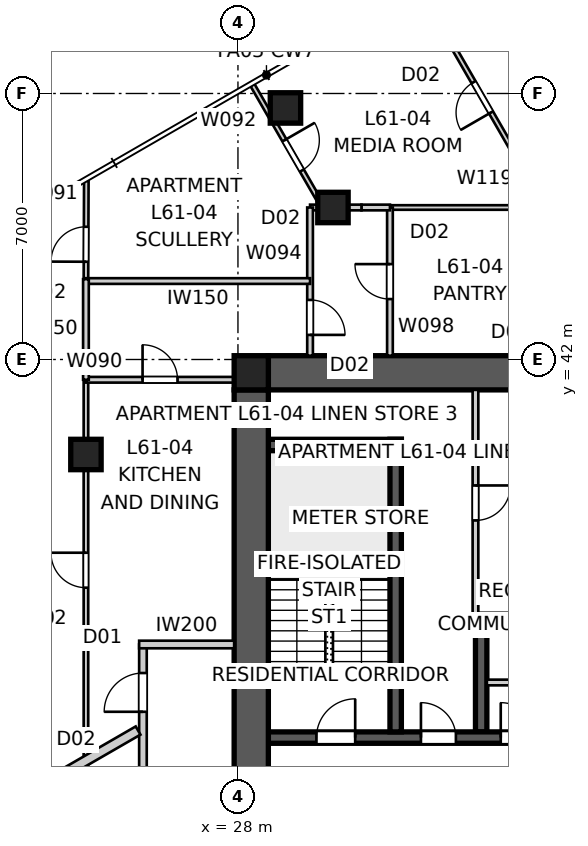
"""IFC4 building model, lengths in metres.
Left out: names, types, materials, properties, quantities, classifications, styles, units other than length and angle.
Written with IfcOpenShell. Run it as: python <this file> out.ifc"""

import sys

from ifc_helpers import new_model, si_unit, direction, frame, frame_2d, origin, origin_2d, place, context, subcontext, project, spatial, polyline, rectangle, outline, extrude, element, fill, save


model = new_model("IFC4")
c1 = context("Model", 3, precision=1e-05, world=origin(), true_north=direction((0.0, 1.0)))
c2 = subcontext(c1, "Body", "Model", "MODEL_VIEW")
j1 = project(units=[si_unit("LENGTHUNIT", "METRE"), si_unit("PLANEANGLEUNIT", "RADIAN")], contexts=[c1])
p1 = place(None, origin())
s1 = spatial("IfcSite", under=j1, at=p1, CompositionType="ELEMENT")
p2 = place(p1, origin())
s2 = spatial("IfcBuilding", under=s1, at=p2, CompositionType="ELEMENT")
p3 = place(p2, frame((0.0, 0.0, 221.8)))
s3 = spatial("IfcBuildingStorey", under=s2, at=p3, CompositionType="ELEMENT", Elevation=221.8)
p4 = place(p3, frame((28.8, 41.65, 0.0), z_axis=(0.0, 0.0, 1.0), x_axis=(1.0, 0.0, 0.0)))
e1 = element("IfcWall", 1, at=p4, inside=s3, PredefinedType="SHEAR", context=c2, shape_type="SweptSolid", body=[
    extrude(outline(polyline([(0.0, -0.45), (22.4, -0.45), (22.4, -0.025), (22.85, -0.025), (22.85, 0.025), (22.4, 0.025), (22.4, 0.45), (0.0, 0.45), (0.0, 0.025), (-0.45, 0.025), (-0.45, -0.025), (0.0, -0.025), (0.0, -0.45)])), origin(), (0.0, 0.0, 1.0), 3.4),
])
p5 = place(p3, frame((28.35, 41.2, 0.0), z_axis=(0.0, 0.0, 1.0), x_axis=(0.0, -1.0, 0.0)))
e2 = element("IfcWall", 2, at=p5, inside=s3, PredefinedType="SHEAR", context=c2, shape_type="SweptSolid", body=[
    extrude(outline(polyline([(0.0, -0.45), (22.4, -0.45), (22.4, -0.025), (22.85, -0.025), (22.85, 0.025), (22.4, 0.025), (22.4, 0.45), (0.0, 0.45), (0.0, 0.025), (-0.45, 0.025), (-0.45, -0.025), (0.0, -0.025), (0.0, -0.45)])), origin(), (0.0, 0.0, 1.0), 3.4),
])
p6 = place(p5, frame((11.14, 0.0, 0.0)))
e3 = element("IfcOpeningElement", 3, at=p6, cuts=e2, PredefinedType="OPENING", context=c2, shape_type="SweptSolid", body=[
    extrude(rectangle(XDim=1.02, YDim=2.4, at=frame_2d((0.51, 1.2))), frame((0.0, 0.46, 0.0), z_axis=(0.0, -1.0, 0.0), x_axis=(1.0, 0.0, 0.0)), (0.0, 0.0, 1.0), 0.92),
])
p7 = place(p3, frame((28.8, 32.05, 0.0), z_axis=(0.0, 0.0, 1.0), x_axis=(1.0, 0.0, 0.0)))
e4 = element("IfcWall", 4, at=p7, inside=s3, PredefinedType="SHEAR", context=c2, shape_type="SweptSolid", body=[
    extrude(rectangle(XDim=22.4, YDim=0.3, at=frame_2d((11.2, 0.0))), origin(), (0.0, 0.0, 1.0), 3.4),
])
p8 = place(p7, frame((19.04, 0.0, 0.0)))
e5 = element("IfcOpeningElement", 5, at=p8, cuts=e4, PredefinedType="OPENING", context=c2, shape_type="SweptSolid", body=[
    extrude(rectangle(XDim=0.92, YDim=2.1, at=frame_2d((0.46, 1.05))), frame((0.0, 0.16, 0.0), z_axis=(0.0, -1.0, 0.0), x_axis=(1.0, 0.0, 0.0)), (0.0, 0.0, 1.0), 0.32),
])
p9 = place(p7, frame((1.265, 0.0, 0.0)))
e6 = element("IfcOpeningElement", 6, at=p9, cuts=e4, PredefinedType="OPENING", context=c2, shape_type="SweptSolid", body=[
    extrude(rectangle(XDim=1.02, YDim=2.1, at=frame_2d((0.51, 1.05))), frame((0.0, 0.16, 0.0), z_axis=(0.0, -1.0, 0.0), x_axis=(1.0, 0.0, 0.0)), (0.0, 0.0, 1.0), 0.32),
])
p10 = place(p7, frame((4.015, 0.0, 0.0)))
e7 = element("IfcOpeningElement", 7, at=p10, cuts=e4, PredefinedType="OPENING", context=c2, shape_type="SweptSolid", body=[
    extrude(rectangle(XDim=0.92, YDim=2.1, at=frame_2d((0.46, 1.05))), frame((0.0, 0.16, 0.0), z_axis=(0.0, -1.0, 0.0), x_axis=(1.0, 0.0, 0.0)), (0.0, 0.0, 1.0), 0.32),
])
p11 = place(p7, frame((6.115, 0.0, 0.0)))
e8 = element("IfcOpeningElement", 8, at=p11, cuts=e4, PredefinedType="OPENING", context=c2, shape_type="SweptSolid", body=[
    extrude(rectangle(XDim=0.92, YDim=2.1, at=frame_2d((0.46, 1.05))), frame((0.0, 0.16, 0.0), z_axis=(0.0, -1.0, 0.0), x_axis=(1.0, 0.0, 0.0)), (0.0, 0.0, 1.0), 0.32),
])
p12 = place(p7, frame((9.79, 0.0, 0.0)))
e9 = element("IfcOpeningElement", 9, at=p12, cuts=e4, PredefinedType="OPENING", context=c2, shape_type="SweptSolid", body=[
    extrude(rectangle(XDim=0.92, YDim=2.1, at=frame_2d((0.46, 1.05))), frame((0.0, 0.16, 0.0), z_axis=(0.0, -1.0, 0.0), x_axis=(1.0, 0.0, 0.0)), (0.0, 0.0, 1.0), 0.32),
])
p13 = place(p7, frame((12.05, 0.0, 0.0)))
e10 = element("IfcOpeningElement", 10, at=p13, cuts=e4, PredefinedType="OPENING", context=c2, shape_type="SweptSolid", body=[
    extrude(rectangle(XDim=1.1, YDim=2.1, at=frame_2d((0.55, 1.05))), frame((0.0, 0.16, 0.0), z_axis=(0.0, -1.0, 0.0), x_axis=(1.0, 0.0, 0.0)), (0.0, 0.0, 1.0), 0.32),
])
p14 = place(p7, frame((14.85, 0.0, 0.0)))
e11 = element("IfcOpeningElement", 11, at=p14, cuts=e4, PredefinedType="OPENING", context=c2, shape_type="SweptSolid", body=[
    extrude(rectangle(XDim=1.1, YDim=2.1, at=frame_2d((0.55, 1.05))), frame((0.0, 0.16, 0.0), z_axis=(0.0, -1.0, 0.0), x_axis=(1.0, 0.0, 0.0)), (0.0, 0.0, 1.0), 0.32),
])
p15 = place(p3, frame((34.25, 35.15, 0.0), z_axis=(0.0, 0.0, 1.0), x_axis=(1.0, 0.0, 0.0)))
e12 = element("IfcWall", 12, at=p15, inside=s3, PredefinedType="SHEAR", context=c2, shape_type="SweptSolid", body=[
    extrude(rectangle(XDim=11.5, YDim=0.3, at=frame_2d((5.75, 0.0))), origin(), (0.0, 0.0, 1.0), 3.4),
])
p16 = place(p3, frame((34.4, 32.2, 0.0), z_axis=(0.0, 0.0, 1.0), x_axis=(0.0, 1.0, 0.0)))
e13 = element("IfcWall", 13, at=p16, inside=s3, PredefinedType="SHEAR", context=c2, shape_type="SweptSolid", body=[
    extrude(rectangle(XDim=2.8, YDim=0.3, at=frame_2d((1.4, 0.0))), origin(), (0.0, 0.0, 1.0), 3.4),
])
p17 = place(p3, frame((32.15, 32.2, 0.0), z_axis=(0.0, 0.0, 1.0), x_axis=(0.0, 1.0, 0.0)))
e14 = element("IfcWall", 14, at=p17, inside=s3, PredefinedType="SHEAR", context=c2, shape_type="SweptSolid", body=[
    extrude(rectangle(XDim=7.7, YDim=0.3, at=frame_2d((3.85, 0.0))), origin(), (0.0, 0.0, 1.0), 3.4),
])
p18 = place(p3, frame((28.8, 39.75, 0.0), z_axis=(0.0, 0.0, 1.0), x_axis=(1.0, 0.0, 0.0)))
e15 = element("IfcWall", 15, at=p18, inside=s3, PredefinedType="SHEAR", context=c2, shape_type="SweptSolid", body=[
    extrude(rectangle(XDim=3.5, YDim=0.3, at=frame_2d((1.75, 0.0))), origin(), (0.0, 0.0, 1.0), 3.4),
])
p19 = place(p3, frame((28.35, 41.65, 0.0), z_axis=(0.0, 0.0, 1.0), x_axis=(1.0, 0.0, 0.0)))
e16 = element("IfcColumn", 16, at=p19, inside=s3, PredefinedType="COLUMN", context=c2, shape_type="SweptSolid", body=[
    extrude(rectangle(XDim=0.9, YDim=0.9, at=origin_2d()), origin(), (0.0, 0.0, 1.0), 3.4),
])
for number, where, z_axis, x_axis in (
    (17, (29.25, 48.62, 0.0), (0.0, 0.0, 1.0), (1.0, 0.0, 0.0)),
    (18, (30.5, 46.0, 0.0), (0.0, 0.0, 1.0), (1.0, 0.0, 0.0)),
    (19, (24.0, 39.5, 0.0), (0.0, 0.0, 1.0), (1.0, 0.0, 0.0)),
):
    element("IfcColumn", number, at=place(p3, frame(where, z_axis=z_axis, x_axis=x_axis)), inside=s3, PredefinedType="COLUMN", context=c2, shape_type="SweptSolid", body=[
        extrude(rectangle(XDim=0.8, YDim=0.8, at=origin_2d()), origin(), (0.0, 0.0, 1.0), 3.4),
    ])
p20 = place(p3, frame((25.5, 25.5, 0.0), z_axis=(0.0, 0.0, 1.0), x_axis=(0.0, 1.0, 0.0)))
e20 = element("IfcWall", 20, at=p20, inside=s3, PredefinedType="PARTITIONING", context=c2, shape_type="SweptSolid", body=[
    extrude(rectangle(XDim=9.0, YDim=0.2, at=frame_2d((4.5, 0.0))), origin(), (0.0, 0.0, 1.0), 3.25),
])
p21 = place(p20, frame((3.492, 0.0, 0.0)))
e21 = element("IfcOpeningElement", 21, at=p21, cuts=e20, PredefinedType="OPENING", context=c2, shape_type="SweptSolid", body=[
    extrude(rectangle(XDim=1.02, YDim=2.34, at=frame_2d((0.51, 1.17))), frame((0.0, 0.11, 0.0), z_axis=(0.0, -1.0, 0.0), x_axis=(1.0, 0.0, 0.0)), (0.0, 0.0, 1.0), 0.22),
])
p22 = place(p20, frame((7.229, 0.0, 0.0)))
e22 = element("IfcOpeningElement", 22, at=p22, cuts=e20, PredefinedType="OPENING", context=c2, shape_type="SweptSolid", body=[
    extrude(rectangle(XDim=1.02, YDim=2.34, at=frame_2d((0.51, 1.17))), frame((0.0, 0.11, 0.0), z_axis=(0.0, -1.0, 0.0), x_axis=(1.0, 0.0, 0.0)), (0.0, 0.0, 1.0), 0.22),
])
p23 = place(p3, frame((27.9, 34.5, 0.0), z_axis=(0.0, 0.0, 1.0), x_axis=(-1.0, 0.0, 0.0)))
e23 = element("IfcWall", 23, at=p23, inside=s3, PredefinedType="PARTITIONING", context=c2, shape_type="SweptSolid", body=[
    extrude(rectangle(XDim=2.5, YDim=0.2, at=frame_2d((1.25, 0.0))), origin(), (0.0, 0.0, 1.0), 3.25),
])
p24 = place(p3, frame((15.889, 26.761, 0.0), z_axis=(0.0, 0.0, 1.0), x_axis=(0.866024069551, 0.500002310952, 0.0)))
e24 = element("IfcWall", 24, at=p24, inside=s3, PredefinedType="PARTITIONING", context=c2, shape_type="SweptSolid", body=[
    extrude(rectangle(XDim=10.95, YDim=0.25, at=frame_2d((5.475, 0.0))), origin(), (0.0, 0.0, 1.0), 3.25),
])
p25 = place(p3, frame((34.25, 41.2, 0.0), z_axis=(0.0, 0.0, 1.0), x_axis=(0.0, -1.0, 0.0)))
e25 = element("IfcWall", 25, at=p25, inside=s3, PredefinedType="SOLIDWALL", context=c2, shape_type="SweptSolid", body=[
    extrude(rectangle(XDim=5.95, YDim=0.15, at=frame_2d((2.975, 0.0))), origin(), (0.0, 0.0, 1.0), 3.25),
])
p26 = place(p25, frame((2.515, 0.0, 0.0)))
e26 = element("IfcOpeningElement", 26, at=p26, cuts=e25, PredefinedType="OPENING", context=c2, shape_type="SweptSolid", body=[
    extrude(rectangle(XDim=0.92, YDim=2.1, at=frame_2d((0.46, 1.05))), frame((0.0, 0.085, 0.0), z_axis=(0.0, -1.0, 0.0), x_axis=(1.0, 0.0, 0.0)), (0.0, 0.0, 1.0), 0.17),
])
p27 = place(p3, frame((24.0, 15.422, 0.0), z_axis=(0.0, 0.0, 1.0), x_axis=(0.0, 1.0, 0.0)))
e27 = element("IfcWall", 27, at=p27, inside=s3, PredefinedType="PARTITIONING", context=c2, shape_type="SweptSolid", body=[
    extrude(rectangle(XDim=26.045, YDim=0.12, at=frame_2d((13.022, 0.0))), origin(), (0.0, 0.0, 1.0), 2.55),
])
p28 = place(p27, frame((13.139, 0.0, 0.0)))
e28 = element("IfcOpeningElement", 28, at=p28, cuts=e27, PredefinedType="OPENING", context=c2, shape_type="SweptSolid", body=[
    extrude(rectangle(XDim=0.92, YDim=2.34, at=frame_2d((0.46, 1.17))), frame((0.0, 0.07, 0.0), z_axis=(0.0, -1.0, 0.0), x_axis=(1.0, 0.0, 0.0)), (0.0, 0.0, 1.0), 0.14),
])
p29 = place(p27, frame((20.573, 0.0, 0.0)))
e29 = element("IfcOpeningElement", 29, at=p29, cuts=e27, PredefinedType="OPENING", context=c2, shape_type="SweptSolid", body=[
    extrude(rectangle(XDim=0.92, YDim=2.34, at=frame_2d((0.46, 1.17))), frame((0.0, 0.07, 0.0), z_axis=(0.0, -1.0, 0.0), x_axis=(1.0, 0.0, 0.0)), (0.0, 0.0, 1.0), 0.14),
])
p30 = place(p27, frame((0.42, 0.0, 0.0)))
e30 = element("IfcOpeningElement", 30, at=p30, cuts=e27, PredefinedType="OPENING", context=c2, shape_type="SweptSolid", body=[
    extrude(rectangle(XDim=0.92, YDim=2.34, at=frame_2d((0.46, 1.17))), frame((0.0, 0.07, 0.0), z_axis=(0.0, -1.0, 0.0), x_axis=(1.0, 0.0, 0.0)), (0.0, 0.0, 1.0), 0.14),
])
p31 = place(p3, frame((24.0, 41.467, 0.0), z_axis=(0.0, 0.0, 1.0), x_axis=(1.0, 0.0, 0.0)))
e31 = element("IfcWall", 31, at=p31, inside=s3, PredefinedType="SOLIDWALL", context=c2, shape_type="SweptSolid", body=[
    extrude(rectangle(XDim=4.82, YDim=0.15, at=frame_2d((2.41, 0.0))), origin(), (0.0, 0.0, 1.0), 3.25),
])
p32 = place(p31, frame((1.49, 0.0, 0.0)))
e32 = element("IfcOpeningElement", 32, at=p32, cuts=e31, PredefinedType="OPENING", context=c2, shape_type="SweptSolid", body=[
    extrude(rectangle(XDim=0.92, YDim=2.1, at=frame_2d((0.46, 1.05))), frame((0.0, 0.085, 0.0), z_axis=(0.0, -1.0, 0.0), x_axis=(1.0, 0.0, 0.0)), (0.0, 0.0, 1.0), 0.17),
])
p33 = place(p3, frame((24.0, 44.115, 0.0), z_axis=(0.0, 0.0, 1.0), x_axis=(0.003773202081, 0.999992881448, 0.0)))
e33 = element("IfcWall", 33, at=p33, inside=s3, PredefinedType="PARTITIONING", context=c2, shape_type="SweptSolid", body=[
    extrude(rectangle(XDim=2.588, YDim=0.12, at=frame_2d((1.294, 0.0))), origin(), (0.0, 0.0, 1.0), 3.25),
])
p34 = place(p33, frame((0.458, 0.0, 0.0)))
e34 = element("IfcOpeningElement", 34, at=p34, cuts=e33, PredefinedType="OPENING", context=c2, shape_type="SweptSolid", body=[
    extrude(rectangle(XDim=0.92, YDim=2.34, at=frame_2d((0.46, 1.17))), frame((0.0, 0.07, 0.0), z_axis=(0.0, -1.0, 0.0), x_axis=(1.0, 0.0, 0.0)), (0.0, 0.0, 1.0), 0.14),
])
p35 = place(p3, frame((28.38, 49.226, 0.0), z_axis=(0.0, 0.0, 1.0), x_axis=(0.499973989716, -0.866040420308, 0.0)))
e35 = element("IfcWall", 35, at=p35, inside=s3, PredefinedType="PARTITIONING", context=c2, shape_type="SweptSolid", body=[
    extrude(rectangle(XDim=3.725, YDim=0.12, at=frame_2d((1.862, 0.0))), origin(), (0.0, 0.0, 1.0), 3.25),
])
p36 = place(p35, frame((1.682, 0.0, 0.0)))
e36 = element("IfcOpeningElement", 36, at=p36, cuts=e35, PredefinedType="OPENING", context=c2, shape_type="SweptSolid", body=[
    extrude(rectangle(XDim=0.92, YDim=2.34, at=frame_2d((0.46, 1.17))), frame((0.0, 0.07, 0.0), z_axis=(0.0, -1.0, 0.0), x_axis=(1.0, 0.0, 0.0)), (0.0, 0.0, 1.0), 0.14),
])
p37 = place(p3, frame((30.633, 46.0, 0.0), z_axis=(0.0, 0.0, 1.0), x_axis=(-1.0, 0.0, 0.0)))
e37 = element("IfcWall", 37, at=p37, inside=s3, PredefinedType="SOLIDWALL", context=c2, shape_type="SweptSolid", body=[
    extrude(rectangle(XDim=0.735, YDim=0.15, at=frame_2d((0.368, 0.0))), origin(), (0.0, 0.0, 1.0), 3.25),
])
p38 = place(p3, frame((29.897, 46.0, 0.0), z_axis=(0.0, 0.0, 1.0), x_axis=(0.0, -1.0, 0.0)))
e38 = element("IfcWall", 38, at=p38, inside=s3, PredefinedType="SOLIDWALL", context=c2, shape_type="SweptSolid", body=[
    extrude(rectangle(XDim=3.9, YDim=0.15, at=frame_2d((1.95, 0.0))), origin(), (0.0, 0.0, 1.0), 3.25),
])
p39 = place(p38, frame((2.433, 0.0, 0.0)))
e39 = element("IfcOpeningElement", 39, at=p39, cuts=e38, PredefinedType="OPENING", context=c2, shape_type="SweptSolid", body=[
    extrude(rectangle(XDim=0.92, YDim=2.34, at=frame_2d((0.46, 1.17))), frame((0.0, 0.085, 0.0), z_axis=(0.0, -1.0, 0.0), x_axis=(1.0, 0.0, 0.0)), (0.0, 0.0, 1.0), 0.17),
])
p40 = place(p3, frame((29.897, 44.065, 0.0), z_axis=(0.0, 0.0, 1.0), x_axis=(-1.0, 0.0, 0.0)))
e40 = element("IfcWall", 40, at=p40, inside=s3, PredefinedType="SOLIDWALL", context=c2, shape_type="SweptSolid", body=[
    extrude(rectangle(XDim=5.897, YDim=0.15, at=frame_2d((2.949, 0.0))), origin(), (0.0, 0.0, 1.0), 3.25),
])
p41 = place(p3, frame((32.0, 46.0, 0.0), z_axis=(0.0, 0.0, 1.0), x_axis=(1.0, 0.0, 0.0)))
e41 = element("IfcWall", 41, at=p41, inside=s3, PredefinedType="PARTITIONING", context=c2, shape_type="SweptSolid", body=[
    extrude(rectangle(XDim=17.213, YDim=0.12, at=frame_2d((8.607, 0.0))), origin(), (0.0, 0.0, 1.0), 3.25),
])
p42 = place(p3, frame((32.0, 42.1, 0.0), z_axis=(0.0, 0.0, 1.0), x_axis=(0.0, 1.0, 0.0)))
e42 = element("IfcWall", 42, at=p42, inside=s3, PredefinedType="SOLIDWALL", context=c2, shape_type="SweptSolid", body=[
    extrude(rectangle(XDim=3.9, YDim=0.15, at=frame_2d((1.95, 0.0))), origin(), (0.0, 0.0, 1.0), 3.25),
])
p43 = place(p42, frame((1.49, 0.0, 0.0)))
e43 = element("IfcOpeningElement", 43, at=p43, cuts=e42, PredefinedType="OPENING", context=c2, shape_type="SweptSolid", body=[
    extrude(rectangle(XDim=0.92, YDim=2.34, at=frame_2d((0.46, 1.17))), frame((0.0, 0.085, 0.0), z_axis=(0.0, -1.0, 0.0), x_axis=(1.0, 0.0, 0.0)), (0.0, 0.0, 1.0), 0.17),
])
p44 = place(p3, frame((24.0, 44.115, 0.0), z_axis=(0.0, 0.0, 1.0), x_axis=(0.0, -1.0, 0.0)))
e44 = element("IfcWall", 44, at=p44, inside=s3, PredefinedType="SOLIDWALL", context=c2, shape_type="SweptSolid", body=[
    extrude(rectangle(XDim=2.648, YDim=0.15, at=frame_2d((1.324, 0.0))), origin(), (0.0, 0.0, 1.0), 3.25),
])
p45 = place(p3, frame((36.103, 46.0, 0.0), z_axis=(0.0, 0.0, 1.0), x_axis=(-0.500013541994, 0.866017585169, 0.0)))
e45 = element("IfcWall", 45, at=p45, inside=s3, PredefinedType="PARTITIONING", context=c2, shape_type="SweptSolid", body=[
    extrude(rectangle(XDim=6.655, YDim=0.12, at=frame_2d((3.328, 0.0))), origin(), (0.0, 0.0, 1.0), 3.25),
])
p46 = place(p45, frame((2.887, 0.0, 0.0)))
e46 = element("IfcOpeningElement", 46, at=p46, cuts=e45, PredefinedType="OPENING", context=c2, shape_type="SweptSolid", body=[
    extrude(rectangle(XDim=0.92, YDim=2.34, at=frame_2d((0.46, 1.17))), frame((0.0, 0.07, 0.0), z_axis=(0.0, -1.0, 0.0), x_axis=(1.0, 0.0, 0.0)), (0.0, 0.0, 1.0), 0.14),
])
p47 = place(p3, frame((32.0, 46.0, 0.0), z_axis=(0.0, 0.0, 1.0), x_axis=(-1.0, 0.0, 0.0)))
e47 = element("IfcWall", 47, at=p47, inside=s3, PredefinedType="SOLIDWALL", context=c2, shape_type="SweptSolid", body=[
    extrude(rectangle(XDim=0.75, YDim=0.15, at=frame_2d((0.375, 0.0))), origin(), (0.0, 0.0, 1.0), 3.25),
])
p48 = place(p3, frame((31.25, 46.0, 0.0), z_axis=(0.0, 0.0, 1.0), x_axis=(-1.0, 0.0, 0.0)))
e48 = element("IfcWall", 48, at=p48, inside=s3, PredefinedType="SOLIDWALL", context=c2, shape_type="SweptSolid", body=[
    extrude(rectangle(XDim=0.545, YDim=0.15, at=frame_2d((0.273, 0.0))), origin(), (0.0, 0.0, 1.0), 2.55),
])
p49 = place(p3, frame((34.55, 33.5, 0.0), z_axis=(0.0, 0.0, 1.0), x_axis=(1.0, 0.0, 0.0)))
e49 = element("IfcWall", 49, at=p49, inside=s3, PredefinedType="SOLIDWALL", context=c2, shape_type="SweptSolid", body=[
    extrude(rectangle(XDim=5.35, YDim=0.15, at=frame_2d((2.675, 0.0))), origin(), (0.0, 0.0, 1.0), 3.25),
])
p50 = place(p49, frame((2.215, 0.0, 0.0)))
e50 = element("IfcOpeningElement", 50, at=p50, cuts=e49, PredefinedType="OPENING", context=c2, shape_type="SweptSolid", body=[
    extrude(rectangle(XDim=0.92, YDim=2.1, at=frame_2d((0.46, 1.05))), frame((0.0, 0.085, 0.0), z_axis=(0.0, -1.0, 0.0), x_axis=(1.0, 0.0, 0.0)), (0.0, 0.0, 1.0), 0.17),
])
p51 = place(p9, origin())
e51 = element("IfcDoor", 51, at=p51, inside=s3, OperationType="SINGLE_SWING_RIGHT", PredefinedType="DOOR", context=c2, shape_type="SweptSolid", body=[
    extrude(rectangle(XDim=1.02, YDim=2.1, at=frame_2d((0.51, 1.05))), frame((0.0, 0.025, 0.0), z_axis=(0.0, -1.0, 0.0), x_axis=(1.0, 0.0, 0.0)), (0.0, 0.0, 1.0), 0.05),
])
fill(e6, e51)
p52 = place(p10, origin())
e52 = element("IfcDoor", 52, at=p52, inside=s3, OperationType="SINGLE_SWING_LEFT", PredefinedType="DOOR", context=c2, shape_type="SweptSolid", body=[
    extrude(rectangle(XDim=0.92, YDim=2.1, at=frame_2d((0.46, 1.05))), frame((0.0, 0.025, 0.0), z_axis=(0.0, -1.0, 0.0), x_axis=(1.0, 0.0, 0.0)), (0.0, 0.0, 1.0), 0.05),
])
fill(e7, e52)
p53 = place(p22, origin())
e53 = element("IfcDoor", 53, at=p53, inside=s3, OperationType="SINGLE_SWING_LEFT", PredefinedType="DOOR", context=c2, shape_type="SweptSolid", body=[
    extrude(rectangle(XDim=1.02, YDim=2.34, at=frame_2d((0.51, 1.17))), frame((0.0, 0.025, 0.0), z_axis=(0.0, -1.0, 0.0), x_axis=(1.0, 0.0, 0.0)), (0.0, 0.0, 1.0), 0.05),
])
fill(e22, e53)
p54 = place(p26, origin())
e54 = element("IfcDoor", 54, at=p54, inside=s3, OperationType="SINGLE_SWING_LEFT", PredefinedType="DOOR", context=c2, shape_type="SweptSolid", body=[
    extrude(rectangle(XDim=0.92, YDim=2.1, at=frame_2d((0.46, 1.05))), frame((0.0, 0.025, 0.0), z_axis=(0.0, -1.0, 0.0), x_axis=(1.0, 0.0, 0.0)), (0.0, 0.0, 1.0), 0.05),
])
fill(e26, e54)
p55 = place(p29, origin())
e55 = element("IfcDoor", 55, at=p55, inside=s3, OperationType="SINGLE_SWING_RIGHT", PredefinedType="DOOR", context=c2, shape_type="SweptSolid", body=[
    extrude(rectangle(XDim=0.92, YDim=2.34, at=frame_2d((0.46, 1.17))), frame((0.0, 0.025, 0.0), z_axis=(0.0, -1.0, 0.0), x_axis=(1.0, 0.0, 0.0)), (0.0, 0.0, 1.0), 0.05),
])
fill(e29, e55)
p56 = place(p32, origin())
e56 = element("IfcDoor", 56, at=p56, inside=s3, OperationType="SINGLE_SWING_LEFT", PredefinedType="DOOR", context=c2, shape_type="SweptSolid", body=[
    extrude(rectangle(XDim=0.92, YDim=2.1, at=frame_2d((0.46, 1.05))), frame((0.0, 0.025, 0.0), z_axis=(0.0, -1.0, 0.0), x_axis=(1.0, 0.0, 0.0)), (0.0, 0.0, 1.0), 0.05),
])
fill(e32, e56)
p57 = place(p34, origin())
e57 = element("IfcDoor", 57, at=p57, inside=s3, OperationType="SINGLE_SWING_LEFT", PredefinedType="DOOR", context=c2, shape_type="SweptSolid", body=[
    extrude(rectangle(XDim=0.92, YDim=2.34, at=frame_2d((0.46, 1.17))), frame((0.0, 0.025, 0.0), z_axis=(0.0, -1.0, 0.0), x_axis=(1.0, 0.0, 0.0)), (0.0, 0.0, 1.0), 0.05),
])
fill(e34, e57)
p58 = place(p39, origin())
e58 = element("IfcDoor", 58, at=p58, inside=s3, OperationType="SINGLE_SWING_RIGHT", PredefinedType="DOOR", context=c2, shape_type="SweptSolid", body=[
    extrude(rectangle(XDim=0.92, YDim=2.34, at=frame_2d((0.46, 1.17))), frame((0.0, 0.025, 0.0), z_axis=(0.0, -1.0, 0.0), x_axis=(1.0, 0.0, 0.0)), (0.0, 0.0, 1.0), 0.05),
])
fill(e39, e58)
p59 = place(p36, origin())
e59 = element("IfcDoor", 59, at=p59, inside=s3, OperationType="SINGLE_SWING_LEFT", PredefinedType="DOOR", context=c2, shape_type="SweptSolid", body=[
    extrude(rectangle(XDim=0.92, YDim=2.34, at=frame_2d((0.46, 1.17))), frame((0.0, 0.025, 0.0), z_axis=(0.0, -1.0, 0.0), x_axis=(1.0, 0.0, 0.0)), (0.0, 0.0, 1.0), 0.05),
])
fill(e36, e59)
p60 = place(p43, origin())
e60 = element("IfcDoor", 60, at=p60, inside=s3, OperationType="SINGLE_SWING_RIGHT", PredefinedType="DOOR", context=c2, shape_type="SweptSolid", body=[
    extrude(rectangle(XDim=0.92, YDim=2.34, at=frame_2d((0.46, 1.17))), frame((0.0, 0.025, 0.0), z_axis=(0.0, -1.0, 0.0), x_axis=(1.0, 0.0, 0.0)), (0.0, 0.0, 1.0), 0.05),
])
fill(e43, e60)
p61 = place(p46, origin())
e61 = element("IfcDoor", 61, at=p61, inside=s3, OperationType="SINGLE_SWING_LEFT", PredefinedType="DOOR", context=c2, shape_type="SweptSolid", body=[
    extrude(rectangle(XDim=0.92, YDim=2.34, at=frame_2d((0.46, 1.17))), frame((0.0, 0.025, 0.0), z_axis=(0.0, -1.0, 0.0), x_axis=(1.0, 0.0, 0.0)), (0.0, 0.0, 1.0), 0.05),
])
fill(e46, e61)
p62 = place(p11, origin())
e62 = element("IfcDoor", 62, at=p62, inside=s3, OperationType="SINGLE_SWING_LEFT", PredefinedType="DOOR", context=c2, shape_type="SweptSolid", body=[
    extrude(rectangle(XDim=0.92, YDim=2.1, at=frame_2d((0.46, 1.05))), frame((0.0, 0.025, 0.0), z_axis=(0.0, -1.0, 0.0), x_axis=(1.0, 0.0, 0.0)), (0.0, 0.0, 1.0), 0.05),
])
fill(e8, e62)
save(model, sys.argv[1])
